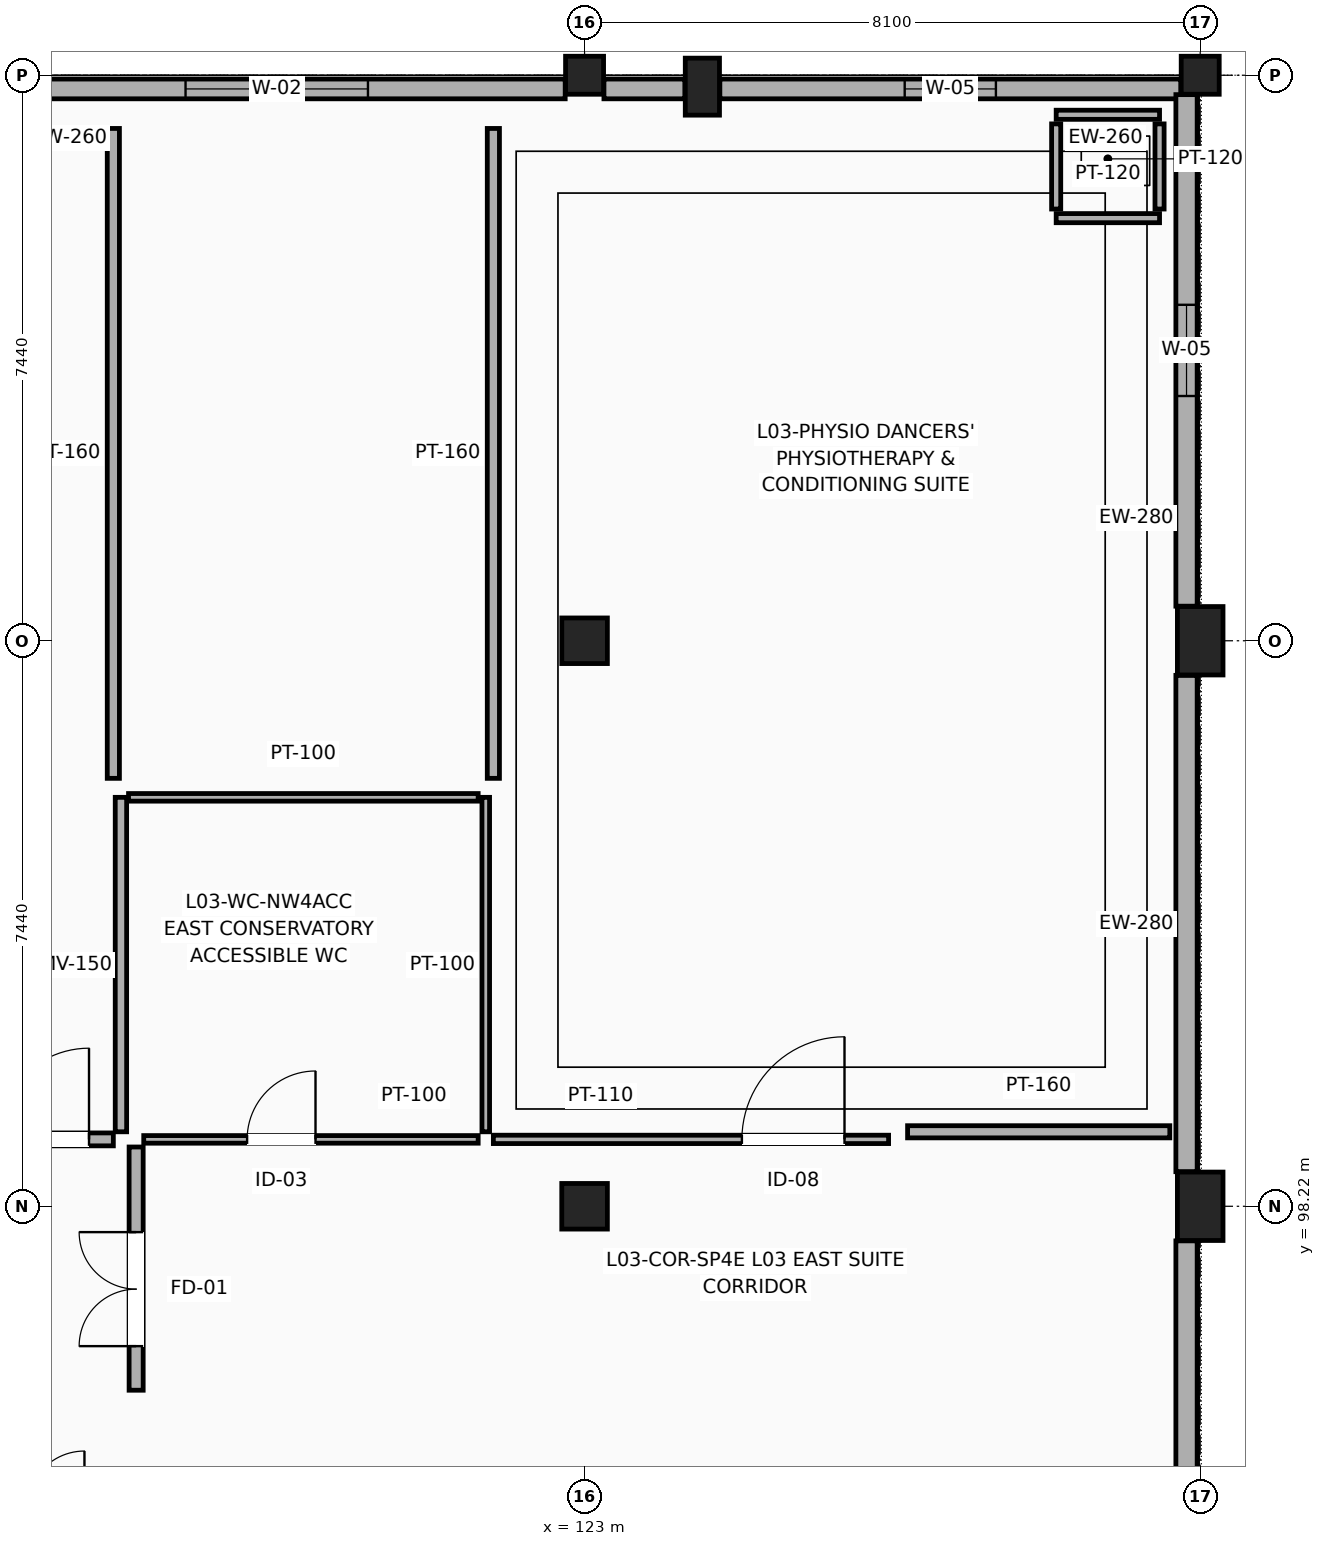
"""IFC4 building model, lengths in metres.
Left out: names, types, materials, properties, quantities, classifications, styles, units other than length and angle.
Written with IfcOpenShell. Run it as: python <this file> out.ifc"""

import sys

from ifc_helpers import new_model, si_unit, direction, frame, frame_2d, origin, origin_2d, place, context, subcontext, project, spatial, rectangle, extrude, element, fill, save


model = new_model("IFC4")
c1 = context("Model", 3, precision=1e-05, world=origin(), true_north=direction((0.0, 1.0)))
c2 = subcontext(c1, "Body", "Model", "MODEL_VIEW")
j1 = project(units=[si_unit("LENGTHUNIT", "METRE"), si_unit("PLANEANGLEUNIT", "RADIAN")], contexts=[c1])
p1 = place(None, origin())
s1 = spatial("IfcSite", under=j1, at=p1, CompositionType="ELEMENT")
p2 = place(p1, origin())
s2 = spatial("IfcBuilding", under=s1, at=p2, CompositionType="ELEMENT")
p3 = place(p2, frame((0.0, 0.0, 14.7)))
s3 = spatial("IfcBuildingStorey", under=s2, at=p3, CompositionType="ELEMENT", Elevation=14.7)
p4 = place(p3, frame((124.55, 112.95, 0.0), z_axis=(0.0, 0.0, 1.0), x_axis=(1.0, 0.0, 0.0)))
e1 = element("IfcColumn", 1, at=p4, inside=s3, PredefinedType="PILASTER", context=c2, shape_type="SweptSolid", body=[
    extrude(rectangle(XDim=0.45, YDim=0.75, at=origin_2d()), origin(), (0.0, 0.0, 1.0), 4.5),
])
for number, where, z_axis, x_axis in (
    (2, (123.0, 98.22, 0.0), (0.0, 0.0, 1.0), (1.0, 0.0, 0.0)),
    (3, (123.0, 105.66, 0.0), (0.0, 0.0, 1.0), (1.0, 0.0, 0.0)),
):
    element("IfcColumn", number, at=place(p3, frame(where, z_axis=z_axis, x_axis=x_axis)), inside=s3, PredefinedType="COLUMN", context=c2, shape_type="SweptSolid", body=[
        extrude(rectangle(XDim=0.6, YDim=0.6, at=origin_2d()), origin(), (0.0, 0.0, 1.0), 4.5),
    ])
p5 = place(p3, frame((123.0, 113.1, 0.0), z_axis=(0.0, 0.0, 1.0), x_axis=(1.0, 0.0, 0.0)))
e4 = element("IfcColumn", 4, at=p5, inside=s3, PredefinedType="COLUMN", context=c2, shape_type="SweptSolid", body=[
    extrude(rectangle(XDim=0.5, YDim=0.5, at=origin_2d()), origin(), (0.0, 0.0, 1.0), 4.5),
])
for number, where, z_axis, x_axis in (
    (5, (131.1, 98.22, 0.0), (0.0, 0.0, 1.0), (1.0, 0.0, 0.0)),
    (6, (131.1, 105.66, 0.0), (0.0, 0.0, 1.0), (1.0, 0.0, 0.0)),
):
    element("IfcColumn", number, at=place(p3, frame(where, z_axis=z_axis, x_axis=x_axis)), inside=s3, PredefinedType="COLUMN", context=c2, shape_type="SweptSolid", body=[
        extrude(rectangle(XDim=0.6, YDim=0.9, at=origin_2d()), origin(), (0.0, 0.0, 1.0), 4.5),
    ])
p6 = place(p3, frame((131.1, 113.1, 0.0), z_axis=(0.0, 0.0, 1.0), x_axis=(1.0, 0.0, 0.0)))
e7 = element("IfcColumn", 7, at=p6, inside=s3, PredefinedType="COLUMN", context=c2, shape_type="SweptSolid", body=[
    extrude(rectangle(XDim=0.5, YDim=0.5, at=origin_2d()), origin(), (0.0, 0.0, 1.0), 4.5),
])
p7 = place(p3, frame((115.155, 112.92, 0.0), z_axis=(0.0, 0.0, 1.0), x_axis=(1.0, 0.0, 0.0)))
e8 = element("IfcWall", 8, at=p7, inside=s3, PredefinedType="SOLIDWALL", context=c2, shape_type="SweptSolid", body=[
    extrude(rectangle(XDim=7.59, YDim=0.26, at=frame_2d((3.795, 0.0))), origin(), (0.0, 0.0, 1.0), 3.377),
])
p8 = place(p7, frame((2.595, 0.0, 0.9)))
e9 = element("IfcOpeningElement", 9, at=p8, cuts=e8, PredefinedType="OPENING", context=c2, shape_type="SweptSolid", body=[
    extrude(rectangle(XDim=2.4, YDim=2.1, at=frame_2d((1.2, 1.05))), frame((0.0, 0.14, 0.0), z_axis=(0.0, -1.0, 0.0), x_axis=(1.0, 0.0, 0.0)), (0.0, 0.0, 1.0), 0.28),
])
p9 = place(p3, frame((124.78, 112.92, 0.0), z_axis=(0.0, 0.0, 1.0), x_axis=(1.0, 0.0, 0.0)))
e10 = element("IfcWall", 10, at=p9, inside=s3, PredefinedType="SOLIDWALL", context=c2, shape_type="SweptSolid", body=[
    extrude(rectangle(XDim=6.065, YDim=0.26, at=frame_2d((3.032, 0.0))), origin(), (0.0, 0.0, 1.0), 3.377),
])
p10 = place(p9, frame((2.432, 0.0, 0.9)))
e11 = element("IfcOpeningElement", 11, at=p10, cuts=e10, PredefinedType="OPENING", context=c2, shape_type="SweptSolid", body=[
    extrude(rectangle(XDim=1.2, YDim=1.8, at=frame_2d((0.6, 0.9))), frame((0.0, 0.14, 0.0), z_axis=(0.0, -1.0, 0.0), x_axis=(1.0, 0.0, 0.0)), (0.0, 0.0, 1.0), 0.28),
])
p11 = place(p3, frame((123.255, 112.92, 0.0), z_axis=(0.0, 0.0, 1.0), x_axis=(1.0, 0.0, 0.0)))
e12 = element("IfcWall", 12, at=p11, inside=s3, PredefinedType="SOLIDWALL", context=c2, shape_type="SweptSolid", body=[
    extrude(rectangle(XDim=1.065, YDim=0.26, at=frame_2d((0.533, 0.0))), origin(), (0.0, 0.0, 1.0), 3.377),
])
p12 = place(p3, frame((130.92, 91.235, 0.0), z_axis=(0.0, 0.0, 1.0), x_axis=(0.0, 1.0, 0.0)))
e13 = element("IfcWall", 13, at=p12, inside=s3, PredefinedType="SOLIDWALL", context=c2, shape_type="SweptSolid", body=[
    extrude(rectangle(XDim=6.53, YDim=0.28, at=frame_2d((3.265, 0.0))), origin(), (0.0, 0.0, 1.0), 3.917),
])
p13 = place(p3, frame((130.92, 98.675, 0.0), z_axis=(0.0, 0.0, 1.0), x_axis=(0.0, 1.0, 0.0)))
e14 = element("IfcWall", 14, at=p13, inside=s3, PredefinedType="SOLIDWALL", context=c2, shape_type="SweptSolid", body=[
    extrude(rectangle(XDim=6.53, YDim=0.28, at=frame_2d((3.265, 0.0))), origin(), (0.0, 0.0, 1.0), 3.577),
])
p14 = place(p3, frame((130.92, 106.115, 0.0), z_axis=(0.0, 0.0, 1.0), x_axis=(0.0, 1.0, 0.0)))
e15 = element("IfcWall", 15, at=p14, inside=s3, PredefinedType="SOLIDWALL", context=c2, shape_type="SweptSolid", body=[
    extrude(rectangle(XDim=6.73, YDim=0.28, at=frame_2d((3.365, 0.0))), origin(), (0.0, 0.0, 1.0), 3.627),
])
p15 = place(p14, frame((2.765, 0.0, 0.95)))
e16 = element("IfcOpeningElement", 16, at=p15, cuts=e15, PredefinedType="OPENING", context=c2, shape_type="SweptSolid", body=[
    extrude(rectangle(XDim=1.2, YDim=1.8, at=frame_2d((0.6, 0.9))), frame((0.0, 0.15, 0.0), z_axis=(0.0, -1.0, 0.0), x_axis=(1.0, 0.0, 0.0)), (0.0, 0.0, 1.0), 0.3),
])
for number, where, z_axis, x_axis in (
    (17, (129.205, 111.22, 0.0), (0.0, 0.0, 1.0), (1.0, 0.0, 0.0)),
    (18, (129.205, 112.58, 0.0), (0.0, 0.0, 1.0), (1.0, 0.0, 0.0)),
):
    element("IfcWall", number, at=place(p3, frame(where, z_axis=z_axis, x_axis=x_axis)), inside=s3, PredefinedType="PARTITIONING", context=c2, shape_type="SweptSolid", body=[
        extrude(rectangle(XDim=1.36, YDim=0.12, at=frame_2d((0.68, 0.0))), origin(), (0.0, 0.0, 1.0), 4.225),
    ])
for number, where, z_axis, x_axis in (
    (19, (129.205, 111.34, 0.0), (0.0, 0.0, 1.0), (0.0, 1.0, 0.0)),
    (20, (130.565, 111.34, 0.0), (0.0, 0.0, 1.0), (0.0, 1.0, 0.0)),
):
    element("IfcWall", number, at=place(p3, frame(where, z_axis=z_axis, x_axis=x_axis)), inside=s3, PredefinedType="PARTITIONING", context=c2, shape_type="SweptSolid", body=[
        extrude(rectangle(XDim=1.12, YDim=0.12, at=frame_2d((0.56, 0.0))), origin(), (0.0, 0.0, 1.0), 4.225),
    ])
p16 = place(p3, frame((117.1, 95.8, 0.0), z_axis=(0.0, 0.0, 1.0), x_axis=(0.0, 1.0, 0.0)))
e21 = element("IfcWall", 21, at=p16, inside=s3, PredefinedType="PARTITIONING", context=c2, shape_type="SweptSolid", body=[
    extrude(rectangle(XDim=3.2, YDim=0.185, at=frame_2d((1.6, 0.0))), origin(), (0.0, 0.0, 1.0), 3.727),
])
p17 = place(p16, frame((0.58, 0.0, 0.0)))
e22 = element("IfcOpeningElement", 22, at=p17, cuts=e21, PredefinedType="OPENING", context=c2, shape_type="SweptSolid", body=[
    extrude(rectangle(XDim=1.5, YDim=2.2, at=frame_2d((0.75, 1.1))), frame((0.0, 0.103, 0.0), z_axis=(0.0, -1.0, 0.0), x_axis=(1.0, 0.0, 0.0)), (0.0, 0.0, 1.0), 0.205),
])
p18 = place(p3, frame((113.2, 99.1, 0.0), z_axis=(0.0, 0.0, 1.0), x_axis=(1.0, 0.0, 0.0)))
e23 = element("IfcWall", 23, at=p18, inside=s3, PredefinedType="PARTITIONING", context=c2, shape_type="SweptSolid", body=[
    extrude(rectangle(XDim=3.6, YDim=0.17, at=frame_2d((1.8, 0.0))), origin(), (0.0, 0.0, 1.0), 3.577),
])
p19 = place(p18, frame((0.88, 0.0, 0.0)))
e24 = element("IfcOpeningElement", 24, at=p19, cuts=e23, PredefinedType="OPENING", context=c2, shape_type="SweptSolid", body=[
    extrude(rectangle(XDim=2.4, YDim=2.8, at=frame_2d((1.2, 1.4))), frame((0.0, 0.095, 0.0), z_axis=(0.0, -1.0, 0.0), x_axis=(1.0, 0.0, 0.0)), (0.0, 0.0, 1.0), 0.19),
])
p20 = place(p3, frame((117.2, 99.1, 0.0), z_axis=(0.0, 0.0, 1.0), x_axis=(1.0, 0.0, 0.0)))
e25 = element("IfcWall", 25, at=p20, inside=s3, PredefinedType="PARTITIONING", context=c2, shape_type="SweptSolid", body=[
    extrude(rectangle(XDim=4.4, YDim=0.1, at=frame_2d((2.2, 0.0))), origin(), (0.0, 0.0, 1.0), 3.827),
])
p21 = place(p20, frame((1.36, 0.0, 0.0)))
e26 = element("IfcOpeningElement", 26, at=p21, cuts=e25, PredefinedType="OPENING", context=c2, shape_type="SweptSolid", body=[
    extrude(rectangle(XDim=0.9, YDim=2.1, at=frame_2d((0.45, 1.05))), frame((0.0, 0.06, 0.0), z_axis=(0.0, -1.0, 0.0), x_axis=(1.0, 0.0, 0.0)), (0.0, 0.0, 1.0), 0.12),
])
p22 = place(p3, frame((121.8, 99.1, 0.0), z_axis=(0.0, 0.0, 1.0), x_axis=(1.0, 0.0, 0.0)))
e27 = element("IfcWall", 27, at=p22, inside=s3, PredefinedType="PARTITIONING", context=c2, shape_type="SweptSolid", body=[
    extrude(rectangle(XDim=5.2, YDim=0.11, at=frame_2d((2.6, 0.0))), origin(), (0.0, 0.0, 1.0), 3.577),
])
p23 = place(p22, frame((3.27, 0.0, 0.0)))
e28 = element("IfcOpeningElement", 28, at=p23, cuts=e27, PredefinedType="OPENING", context=c2, shape_type="SweptSolid", body=[
    extrude(rectangle(XDim=1.35, YDim=2.2, at=frame_2d((0.675, 1.1))), frame((0.0, 0.065, 0.0), z_axis=(0.0, -1.0, 0.0), x_axis=(1.0, 0.0, 0.0)), (0.0, 0.0, 1.0), 0.13),
])
p24 = place(p3, frame((116.9, 99.2, 0.0), z_axis=(0.0, 0.0, 1.0), x_axis=(0.0, 1.0, 0.0)))
e29 = element("IfcWall", 29, at=p24, inside=s3, PredefinedType="MOVABLE", context=c2, shape_type="SweptSolid", body=[
    extrude(rectangle(XDim=4.4, YDim=0.15, at=frame_2d((2.2, 0.0))), origin(), (0.0, 0.0, 1.0), 4.225),
])
p25 = place(p3, frame((121.7, 99.2, 0.0), z_axis=(0.0, 0.0, 1.0), x_axis=(0.0, 1.0, 0.0)))
e30 = element("IfcWall", 30, at=p25, inside=s3, PredefinedType="PARTITIONING", context=c2, shape_type="SweptSolid", body=[
    extrude(rectangle(XDim=4.4, YDim=0.1, at=frame_2d((2.2, 0.0))), origin(), (0.0, 0.0, 1.0), 4.225),
])
p26 = place(p3, frame((116.8, 103.85, 0.0), z_axis=(0.0, 0.0, 1.0), x_axis=(0.0, 1.0, 0.0)))
e31 = element("IfcWall", 31, at=p26, inside=s3, PredefinedType="PARTITIONING", context=c2, shape_type="SweptSolid", body=[
    extrude(rectangle(XDim=8.55, YDim=0.16, at=frame_2d((4.275, 0.0))), origin(), (0.0, 0.0, 1.0), 3.727),
])
p27 = place(p3, frame((117.0, 103.6, 0.0), z_axis=(0.0, 0.0, 1.0), x_axis=(1.0, 0.0, 0.0)))
e32 = element("IfcWall", 32, at=p27, inside=s3, PredefinedType="PARTITIONING", context=c2, shape_type="SweptSolid", body=[
    extrude(rectangle(XDim=4.6, YDim=0.1, at=frame_2d((2.3, 0.0))), origin(), (0.0, 0.0, 1.0), 3.827),
])
p28 = place(p3, frame((127.25, 99.2, 0.0), z_axis=(0.0, 0.0, 1.0), x_axis=(1.0, 0.0, 0.0)))
e33 = element("IfcWall", 33, at=p28, inside=s3, PredefinedType="PARTITIONING", context=c2, shape_type="SweptSolid", body=[
    extrude(rectangle(XDim=3.45, YDim=0.16, at=frame_2d((1.725, 0.0))), origin(), (0.0, 0.0, 1.0), 3.777),
])
p29 = place(p3, frame((121.8, 103.85, 0.0), z_axis=(0.0, 0.0, 1.0), x_axis=(0.0, 1.0, 0.0)))
e34 = element("IfcWall", 34, at=p29, inside=s3, PredefinedType="PARTITIONING", context=c2, shape_type="SweptSolid", body=[
    extrude(rectangle(XDim=8.55, YDim=0.16, at=frame_2d((4.275, 0.0))), origin(), (0.0, 0.0, 1.0), 3.727),
])
p30 = place(p8, origin())
e35 = element("IfcWindow", 35, at=p30, inside=s3, PartitioningType="SINGLE_PANEL", PredefinedType="WINDOW", context=c2, shape_type="SweptSolid", body=[
    extrude(rectangle(XDim=2.4, YDim=2.1, at=frame_2d((1.2, 1.05))), frame((0.0, 0.03, 0.0), z_axis=(0.0, -1.0, 0.0), x_axis=(1.0, 0.0, 0.0)), (0.0, 0.0, 1.0), 0.06),
])
fill(e9, e35)
p31 = place(p10, origin())
e36 = element("IfcWindow", 36, at=p31, inside=s3, PartitioningType="SINGLE_PANEL", PredefinedType="WINDOW", context=c2, shape_type="SweptSolid", body=[
    extrude(rectangle(XDim=1.2, YDim=1.8, at=frame_2d((0.6, 0.9))), frame((0.0, 0.03, 0.0), z_axis=(0.0, -1.0, 0.0), x_axis=(1.0, 0.0, 0.0)), (0.0, 0.0, 1.0), 0.06),
])
fill(e11, e36)
p32 = place(p15, origin())
e37 = element("IfcWindow", 37, at=p32, inside=s3, PartitioningType="SINGLE_PANEL", PredefinedType="WINDOW", context=c2, shape_type="SweptSolid", body=[
    extrude(rectangle(XDim=1.2, YDim=1.8, at=frame_2d((0.6, 0.9))), frame((0.0, 0.03, 0.0), z_axis=(0.0, -1.0, 0.0), x_axis=(1.0, 0.0, 0.0)), (0.0, 0.0, 1.0), 0.06),
])
fill(e16, e37)
p33 = place(p17, origin())
e38 = element("IfcDoor", 38, at=p33, inside=s3, OperationType="DOUBLE_DOOR_SINGLE_SWING", PredefinedType="DOOR", context=c2, shape_type="SweptSolid", body=[
    extrude(rectangle(XDim=1.5, YDim=2.2, at=frame_2d((0.75, 1.1))), frame((0.0, 0.025, 0.0), z_axis=(0.0, -1.0, 0.0), x_axis=(1.0, 0.0, 0.0)), (0.0, 0.0, 1.0), 0.05),
])
fill(e22, e38)
p34 = place(p19, origin())
e39 = element("IfcDoor", 39, at=p34, inside=s3, OperationType="DOUBLE_DOOR_SINGLE_SWING", PredefinedType="DOOR", context=c2, shape_type="SweptSolid", body=[
    extrude(rectangle(XDim=2.4, YDim=2.8, at=frame_2d((1.2, 1.4))), frame((0.0, 0.025, 0.0), z_axis=(0.0, -1.0, 0.0), x_axis=(1.0, 0.0, 0.0)), (0.0, 0.0, 1.0), 0.05),
])
fill(e24, e39)
p35 = place(p21, origin())
e40 = element("IfcDoor", 40, at=p35, inside=s3, OperationType="SINGLE_SWING_RIGHT", PredefinedType="DOOR", context=c2, shape_type="SweptSolid", body=[
    extrude(rectangle(XDim=0.9, YDim=2.1, at=frame_2d((0.45, 1.05))), frame((0.0, 0.025, 0.0), z_axis=(0.0, -1.0, 0.0), x_axis=(1.0, 0.0, 0.0)), (0.0, 0.0, 1.0), 0.05),
])
fill(e26, e40)
p36 = place(p23, origin())
e41 = element("IfcDoor", 41, at=p36, inside=s3, OperationType="SINGLE_SWING_RIGHT", PredefinedType="DOOR", context=c2, shape_type="SweptSolid", body=[
    extrude(rectangle(XDim=1.35, YDim=2.2, at=frame_2d((0.675, 1.1))), frame((0.0, 0.025, 0.0), z_axis=(0.0, -1.0, 0.0), x_axis=(1.0, 0.0, 0.0)), (0.0, 0.0, 1.0), 0.05),
])
fill(e28, e41)
save(model, sys.argv[1])
